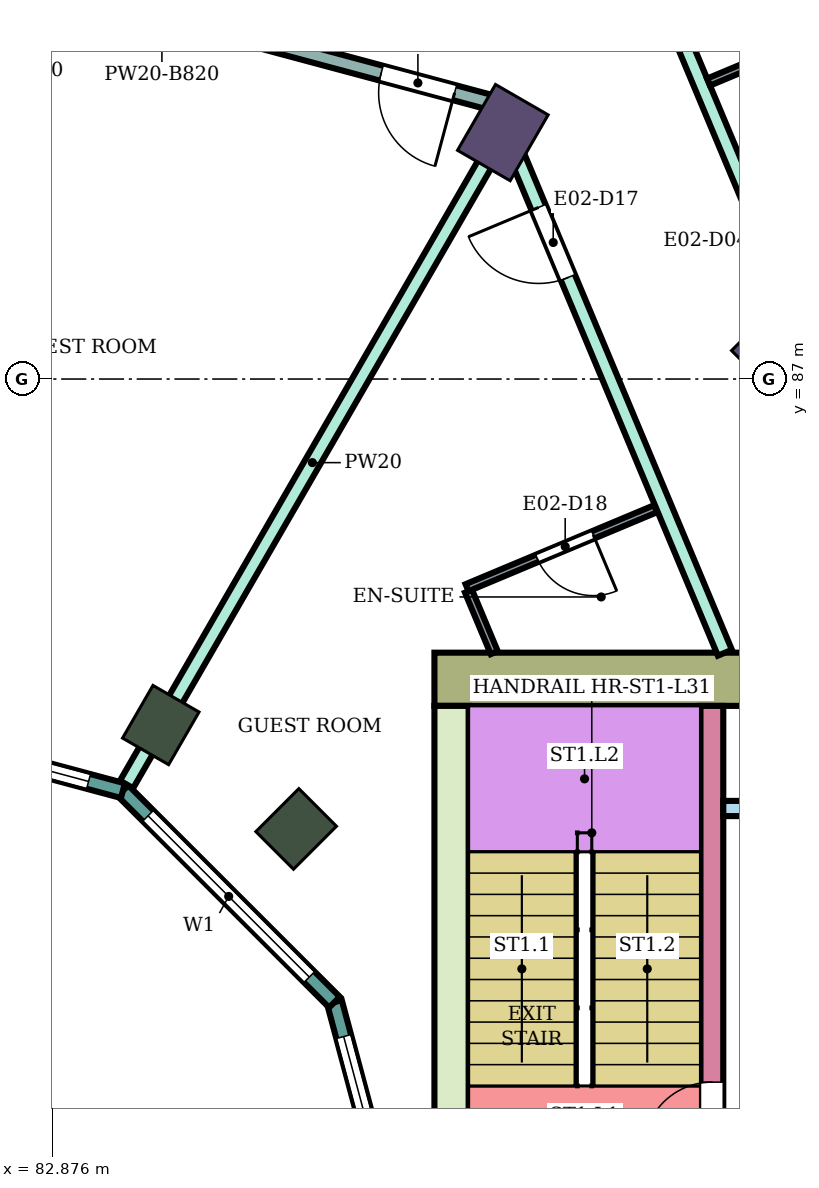
"""IFC4 building model, lengths in metres.
Left out: names, types, materials, properties, quantities, classifications, styles, units other than length and angle.
Written with IfcOpenShell. Run it as: python <this file> out.ifc"""

import sys

from ifc_helpers import new_model, si_unit, direction, frame, frame_2d, origin, origin_2d, place, context, subcontext, project, spatial, rectangle, extrude, element, fill, save


model = new_model("IFC4")
c1 = context("Model", 3, precision=1e-05, world=origin(), true_north=direction((0.0, 1.0)))
c2 = subcontext(c1, "Body", "Model", "MODEL_VIEW")
j1 = project(units=[si_unit("LENGTHUNIT", "METRE"), si_unit("PLANEANGLEUNIT", "RADIAN")], contexts=[c1])
p1 = place(None, origin())
s1 = spatial("IfcSite", under=j1, at=p1, CompositionType="ELEMENT")
p2 = place(p1, origin())
s2 = spatial("IfcBuilding", under=s1, at=p2, CompositionType="ELEMENT")
p3 = place(p2, frame((0.0, 0.0, 134.1)))
s3 = spatial("IfcBuildingStorey", under=s2, at=p3, CompositionType="ELEMENT", Elevation=134.1)
for number, where, z_axis, x_axis in (
    (1, (92.445, 87.445, 0.0), (0.0, 0.0, 1.0), (0.707, 0.707, 0.0)),
    (2, (88.8, 90.242, 0.0), (0.0, 0.0, 1.0), (0.5, 0.866, 0.0)),
):
    element("IfcColumn", number, at=place(p3, frame(where, z_axis=z_axis, x_axis=x_axis)), inside=s3, PredefinedType="COLUMN", context=c2, shape_type="SweptSolid", body=[
        extrude(rectangle(XDim=1.0, YDim=0.8, at=origin_2d()), origin(), (0.0, 0.0, 1.0), 3.9),
    ])
for number, where, z_axis, x_axis in (
    (3, (86.081, 81.081, 0.0), (0.0, 0.0, 1.0), (0.707, 0.707, 0.0)),
    (4, (84.3, 82.448, 0.0), (0.0, 0.0, 1.0), (0.5, 0.866, 0.0)),
):
    element("IfcColumn", number, at=place(p3, frame(where, z_axis=z_axis, x_axis=x_axis)), inside=s3, PredefinedType="COLUMN", context=c2, shape_type="SweptSolid", body=[
        extrude(rectangle(XDim=0.8, YDim=0.7, at=origin_2d()), origin(), (0.0, 0.0, 1.0), 3.9),
    ])
p4 = place(p3, frame((87.9, 83.05, 0.0), z_axis=(0.0, 0.0, 1.0), x_axis=(1.0, 0.0, 0.0)))
e5 = element("IfcWall", 5, at=p4, inside=s3, PredefinedType="SHEAR", context=c2, shape_type="SweptSolid", body=[
    extrude(rectangle(XDim=14.8, YDim=0.7, at=frame_2d((7.4, 0.0))), origin(), (0.0, 0.0, 1.0), 3.58),
])
p5 = place(p4, frame((4.2, 0.0, 0.0)))
e6 = element("IfcOpeningElement", 6, at=p5, cuts=e5, PredefinedType="OPENING", context=c2, shape_type="SweptSolid", body=[
    extrude(rectangle(XDim=2.4, YDim=2.4, at=frame_2d((1.2, 1.2))), frame((0.0, 0.36, 0.0), z_axis=(0.0, -1.0, 0.0), x_axis=(1.0, 0.0, 0.0)), (0.0, 0.0, 1.0), 0.72),
])
p6 = place(p3, frame((88.125, 75.0, 0.0), z_axis=(0.0, 0.0, 1.0), x_axis=(0.0, 1.0, 0.0)))
e7 = element("IfcWall", 7, at=p6, inside=s3, PredefinedType="SHEAR", context=c2, shape_type="SweptSolid", body=[
    extrude(rectangle(XDim=7.7, YDim=0.45, at=frame_2d((3.85, 0.0))), origin(), (0.0, 0.0, 1.0), 3.58),
])
p7 = place(p3, frame((91.55, 75.0, 0.0), z_axis=(0.0, 0.0, 1.0), x_axis=(0.0, 1.0, 0.0)))
e8 = element("IfcWall", 8, at=p7, inside=s3, PredefinedType="SHEAR", context=c2, shape_type="SweptSolid", body=[
    extrude(rectangle(XDim=7.7, YDim=0.3, at=frame_2d((3.85, 0.0))), origin(), (0.0, 0.0, 1.0), 3.58),
])
p8 = place(p7, frame((1.85, 0.0, 0.0)))
e9 = element("IfcOpeningElement", 9, at=p8, cuts=e8, PredefinedType="OPENING", context=c2, shape_type="SweptSolid", body=[
    extrude(rectangle(XDim=0.9, YDim=2.1, at=frame_2d((0.45, 1.05))), frame((0.0, 0.16, 0.0), z_axis=(0.0, -1.0, 0.0), x_axis=(1.0, 0.0, 0.0)), (0.0, 0.0, 1.0), 0.32),
])
p9 = place(p3, frame((91.7, 81.35, 0.0), z_axis=(0.0, 0.0, 1.0), x_axis=(1.0, 0.0, 0.0)))
e10 = element("IfcWall", 10, at=p9, inside=s3, PredefinedType="SHEAR", context=c2, shape_type="SweptSolid", body=[
    extrude(rectangle(XDim=4.5, YDim=0.2, at=frame_2d((2.25, 0.0))), origin(), (0.0, 0.0, 1.0), 3.58),
])
p10 = place(p3, frame((87.604, 75.0, 0.0), z_axis=(0.0, 0.0, 1.0), x_axis=(-0.258789828301, 0.965933654434, 0.0)))
e11 = element("IfcWall", 11, at=p10, inside=s3, PredefinedType="NOTDEFINED", context=c2, shape_type="SweptSolid", body=[
    extrude(rectangle(XDim=3.936, YDim=0.2, at=frame_2d((1.968, 0.0))), origin(), (0.0, 0.0, 1.0), 3.9),
])
p11 = place(p10, frame((0.468, 0.0, 0.9)))
e12 = element("IfcOpeningElement", 12, at=p11, cuts=e11, PredefinedType="OPENING", context=c2, shape_type="SweptSolid", body=[
    extrude(rectangle(XDim=3.0, YDim=2.3, at=frame_2d((1.5, 1.15))), frame((0.0, 0.11, 0.0), z_axis=(0.0, -1.0, 0.0), x_axis=(1.0, 0.0, 0.0)), (0.0, 0.0, 1.0), 0.22),
])
p12 = place(p3, frame((86.585, 78.802, 0.0), z_axis=(0.0, 0.0, 1.0), x_axis=(-0.707106781187, 0.707106781187, 0.0)))
e13 = element("IfcWall", 13, at=p12, inside=s3, PredefinedType="NOTDEFINED", context=c2, shape_type="SweptSolid", body=[
    extrude(rectangle(XDim=3.936, YDim=0.2, at=frame_2d((1.968, 0.0))), origin(), (0.0, 0.0, 1.0), 3.9),
])
p13 = place(p12, frame((0.468, 0.0, 0.9)))
e14 = element("IfcOpeningElement", 14, at=p13, cuts=e13, PredefinedType="OPENING", context=c2, shape_type="SweptSolid", body=[
    extrude(rectangle(XDim=3.0, YDim=2.3, at=frame_2d((1.5, 1.15))), frame((0.0, 0.11, 0.0), z_axis=(0.0, -1.0, 0.0), x_axis=(1.0, 0.0, 0.0)), (0.0, 0.0, 1.0), 0.22),
])
p14 = place(p3, frame((83.802, 81.585, 0.0), z_axis=(0.0, 0.0, 1.0), x_axis=(-0.965933654434, 0.258789828301, 0.0)))
e15 = element("IfcWall", 15, at=p14, inside=s3, PredefinedType="NOTDEFINED", context=c2, shape_type="SweptSolid", body=[
    extrude(rectangle(XDim=3.936, YDim=0.2, at=frame_2d((1.968, 0.0))), origin(), (0.0, 0.0, 1.0), 3.9),
])
p15 = place(p14, frame((0.468, 0.0, 0.9)))
e16 = element("IfcOpeningElement", 16, at=p15, cuts=e15, PredefinedType="OPENING", context=c2, shape_type="SweptSolid", body=[
    extrude(rectangle(XDim=3.0, YDim=2.3, at=frame_2d((1.5, 1.15))), frame((0.0, 0.11, 0.0), z_axis=(0.0, -1.0, 0.0), x_axis=(1.0, 0.0, 0.0)), (0.0, 0.0, 1.0), 0.22),
])
p16 = place(p3, frame((80.0, 92.954, 0.0), z_axis=(0.0, 0.0, 1.0), x_axis=(0.96592536278, -0.258820774936, 0.0)))
e17 = element("IfcWall", 17, at=p16, inside=s3, PredefinedType="PARTITIONING", context=c2, shape_type="SweptSolid", body=[
    extrude(rectangle(XDim=8.934, YDim=0.2, at=frame_2d((4.467, 0.0))), origin(), (0.0, 0.0, 1.0), 3.08),
])
p17 = place(p16, frame((7.454, 0.0, 0.0)))
e18 = element("IfcOpeningElement", 18, at=p17, cuts=e17, PredefinedType="OPENING", context=c2, shape_type="SweptSolid", body=[
    extrude(rectangle(XDim=1.0, YDim=2.1, at=frame_2d((0.5, 1.05))), frame((0.0, 0.11, 0.0), z_axis=(0.0, -1.0, 0.0), x_axis=(1.0, 0.0, 0.0)), (0.0, 0.0, 1.0), 0.22),
])
p18 = place(p3, frame((83.85, 81.667, 0.0), z_axis=(0.0, 0.0, 1.0), x_axis=(0.500092047414, 0.865972253663, 0.0)))
e19 = element("IfcWall", 19, at=p18, inside=s3, PredefinedType="PARTITIONING", context=c2, shape_type="SweptSolid", body=[
    extrude(rectangle(XDim=9.778, YDim=0.2, at=frame_2d((4.889, 0.0))), origin(), (0.0, 0.0, 1.0), 3.45),
])
p19 = place(p3, frame((88.698, 90.624, 0.0), z_axis=(0.0, 0.0, 1.0), x_axis=(0.386027055918, -0.922487459047, 0.0)))
e20 = element("IfcWall", 20, at=p19, inside=s3, PredefinedType="PARTITIONING", context=c2, shape_type="SweptSolid", body=[
    extrude(rectangle(XDim=7.832, YDim=0.2, at=frame_2d((3.916, 0.0))), origin(), (0.0, 0.0, 1.0), 3.45),
])
p20 = place(p19, frame((1.482, 0.0, 0.0)))
e21 = element("IfcOpeningElement", 21, at=p20, cuts=e20, PredefinedType="OPENING", context=c2, shape_type="SweptSolid", body=[
    extrude(rectangle(XDim=1.0, YDim=2.1, at=frame_2d((0.5, 1.05))), frame((0.0, 0.11, 0.0), z_axis=(0.0, -1.0, 0.0), x_axis=(1.0, 0.0, 0.0)), (0.0, 0.0, 1.0), 0.22),
])
p21 = place(p3, frame((90.604, 92.805, 0.0), z_axis=(0.0, 0.0, 1.0), x_axis=(0.386199042801, -0.922415470024, 0.0)))
e22 = element("IfcWall", 22, at=p21, inside=s3, PredefinedType="PARTITIONING", context=c2, shape_type="SweptSolid", body=[
    extrude(rectangle(XDim=8.48, YDim=0.2, at=frame_2d((4.24, 0.0))), origin(), (0.0, 0.0, 1.0), 3.45),
])
p22 = place(p21, frame((3.823, 0.0, 0.0)))
e23 = element("IfcOpeningElement", 23, at=p22, cuts=e22, PredefinedType="OPENING", context=c2, shape_type="SweptSolid", body=[
    extrude(rectangle(XDim=1.0, YDim=2.1, at=frame_2d((0.5, 1.05))), frame((0.0, 0.11, 0.0), z_axis=(0.0, -1.0, 0.0), x_axis=(1.0, 0.0, 0.0)), (0.0, 0.0, 1.0), 0.22),
])
p23 = place(p3, frame((88.348, 84.209, 0.0), z_axis=(0.0, 0.0, 1.0), x_axis=(0.386077497504, -0.922466349479, 0.0)))
e24 = element("IfcWall", 24, at=p23, inside=s3, PredefinedType="PARTITIONING", context=c2, shape_type="SweptSolid", body=[
    extrude(rectangle(XDim=0.877, YDim=0.1, at=frame_2d((0.438, 0.0))), origin(), (0.0, 0.0, 1.0), 3.45),
])
p24 = place(p3, frame((88.329, 84.255, 0.0), z_axis=(0.0, 0.0, 1.0), x_axis=(0.922320663728, 0.386425404522, 0.0)))
e25 = element("IfcWall", 25, at=p24, inside=s3, PredefinedType="PARTITIONING", context=c2, shape_type="SweptSolid", body=[
    extrude(rectangle(XDim=2.69, YDim=0.1, at=frame_2d((1.345, 0.0))), origin(), (0.0, 0.0, 1.0), 3.45),
])
p25 = place(p24, frame((1.0, 0.0, 0.0)))
e26 = element("IfcOpeningElement", 26, at=p25, cuts=e25, PredefinedType="OPENING", context=c2, shape_type="SweptSolid", body=[
    extrude(rectangle(XDim=0.8, YDim=2.1, at=frame_2d((0.4, 1.05))), frame((0.0, 0.06, 0.0), z_axis=(0.0, -1.0, 0.0), x_axis=(1.0, 0.0, 0.0)), (0.0, 0.0, 1.0), 0.12),
])
p26 = place(p3, frame((91.507, 90.907, 0.0), z_axis=(0.0, 0.0, 1.0), x_axis=(0.922344808264, 0.38636777126, 0.0)))
e27 = element("IfcWall", 27, at=p26, inside=s3, PredefinedType="PARTITIONING", context=c2, shape_type="SweptSolid", body=[
    extrude(rectangle(XDim=2.65, YDim=0.1, at=frame_2d((1.325, 0.0))), origin(), (0.0, 0.0, 1.0), 3.45),
])
p27 = place(p11, origin())
e28 = element("IfcWindow", 28, at=p27, inside=s3, PartitioningType="SINGLE_PANEL", PredefinedType="WINDOW", context=c2, shape_type="SweptSolid", body=[
    extrude(rectangle(XDim=3.0, YDim=2.3, at=frame_2d((1.5, 1.15))), frame((0.0, 0.03, 0.0), z_axis=(0.0, -1.0, 0.0), x_axis=(1.0, 0.0, 0.0)), (0.0, 0.0, 1.0), 0.06),
])
fill(e12, e28)
p28 = place(p13, origin())
e29 = element("IfcWindow", 29, at=p28, inside=s3, PartitioningType="SINGLE_PANEL", PredefinedType="WINDOW", context=c2, shape_type="SweptSolid", body=[
    extrude(rectangle(XDim=3.0, YDim=2.3, at=frame_2d((1.5, 1.15))), frame((0.0, 0.03, 0.0), z_axis=(0.0, -1.0, 0.0), x_axis=(1.0, 0.0, 0.0)), (0.0, 0.0, 1.0), 0.06),
])
fill(e14, e29)
p29 = place(p15, origin())
e30 = element("IfcWindow", 30, at=p29, inside=s3, PartitioningType="SINGLE_PANEL", PredefinedType="WINDOW", context=c2, shape_type="SweptSolid", body=[
    extrude(rectangle(XDim=3.0, YDim=2.3, at=frame_2d((1.5, 1.15))), frame((0.0, 0.03, 0.0), z_axis=(0.0, -1.0, 0.0), x_axis=(1.0, 0.0, 0.0)), (0.0, 0.0, 1.0), 0.06),
])
fill(e16, e30)
p30 = place(p20, frame((1.0, 0.0, 0.0), z_axis=(0.0, 0.0, 1.0), x_axis=(-1.0, 0.0, 0.0)))
e31 = element("IfcDoor", 31, at=p30, inside=s3, OperationType="SINGLE_SWING_RIGHT", PredefinedType="DOOR", context=c2, shape_type="SweptSolid", body=[
    extrude(rectangle(XDim=1.0, YDim=2.1, at=frame_2d((0.5, 1.05))), frame((0.0, 0.025, 0.0), z_axis=(0.0, -1.0, 0.0), x_axis=(1.0, 0.0, 0.0)), (0.0, 0.0, 1.0), 0.05),
])
fill(e21, e31)
p31 = place(p25, frame((0.8, 0.0, 0.0), z_axis=(0.0, 0.0, 1.0), x_axis=(-1.0, 0.0, 0.0)))
e32 = element("IfcDoor", 32, at=p31, inside=s3, OperationType="SINGLE_SWING_LEFT", PredefinedType="DOOR", context=c2, shape_type="SweptSolid", body=[
    extrude(rectangle(XDim=0.8, YDim=2.1, at=frame_2d((0.4, 1.05))), frame((0.0, 0.025, 0.0), z_axis=(0.0, -1.0, 0.0), x_axis=(1.0, 0.0, 0.0)), (0.0, 0.0, 1.0), 0.05),
])
fill(e26, e32)
p32 = place(p17, frame((1.0, 0.0, 0.0), z_axis=(0.0, 0.0, 1.0), x_axis=(-1.0, 0.0, 0.0)))
e33 = element("IfcDoor", 33, at=p32, inside=s3, OperationType="SINGLE_SWING_LEFT", PredefinedType="DOOR", context=c2, shape_type="SweptSolid", body=[
    extrude(rectangle(XDim=1.0, YDim=2.1, at=frame_2d((0.5, 1.05))), frame((0.0, 0.025, 0.0), z_axis=(0.0, -1.0, 0.0), x_axis=(1.0, 0.0, 0.0)), (0.0, 0.0, 1.0), 0.05),
])
fill(e18, e33)
p33 = place(p8, origin())
e34 = element("IfcDoor", 34, at=p33, inside=s3, OperationType="SINGLE_SWING_LEFT", PredefinedType="DOOR", context=c2, shape_type="SweptSolid", body=[
    extrude(rectangle(XDim=0.9, YDim=2.1, at=frame_2d((0.45, 1.05))), frame((0.0, 0.025, 0.0), z_axis=(0.0, -1.0, 0.0), x_axis=(1.0, 0.0, 0.0)), (0.0, 0.0, 1.0), 0.05),
])
fill(e9, e34)
save(model, sys.argv[1])
